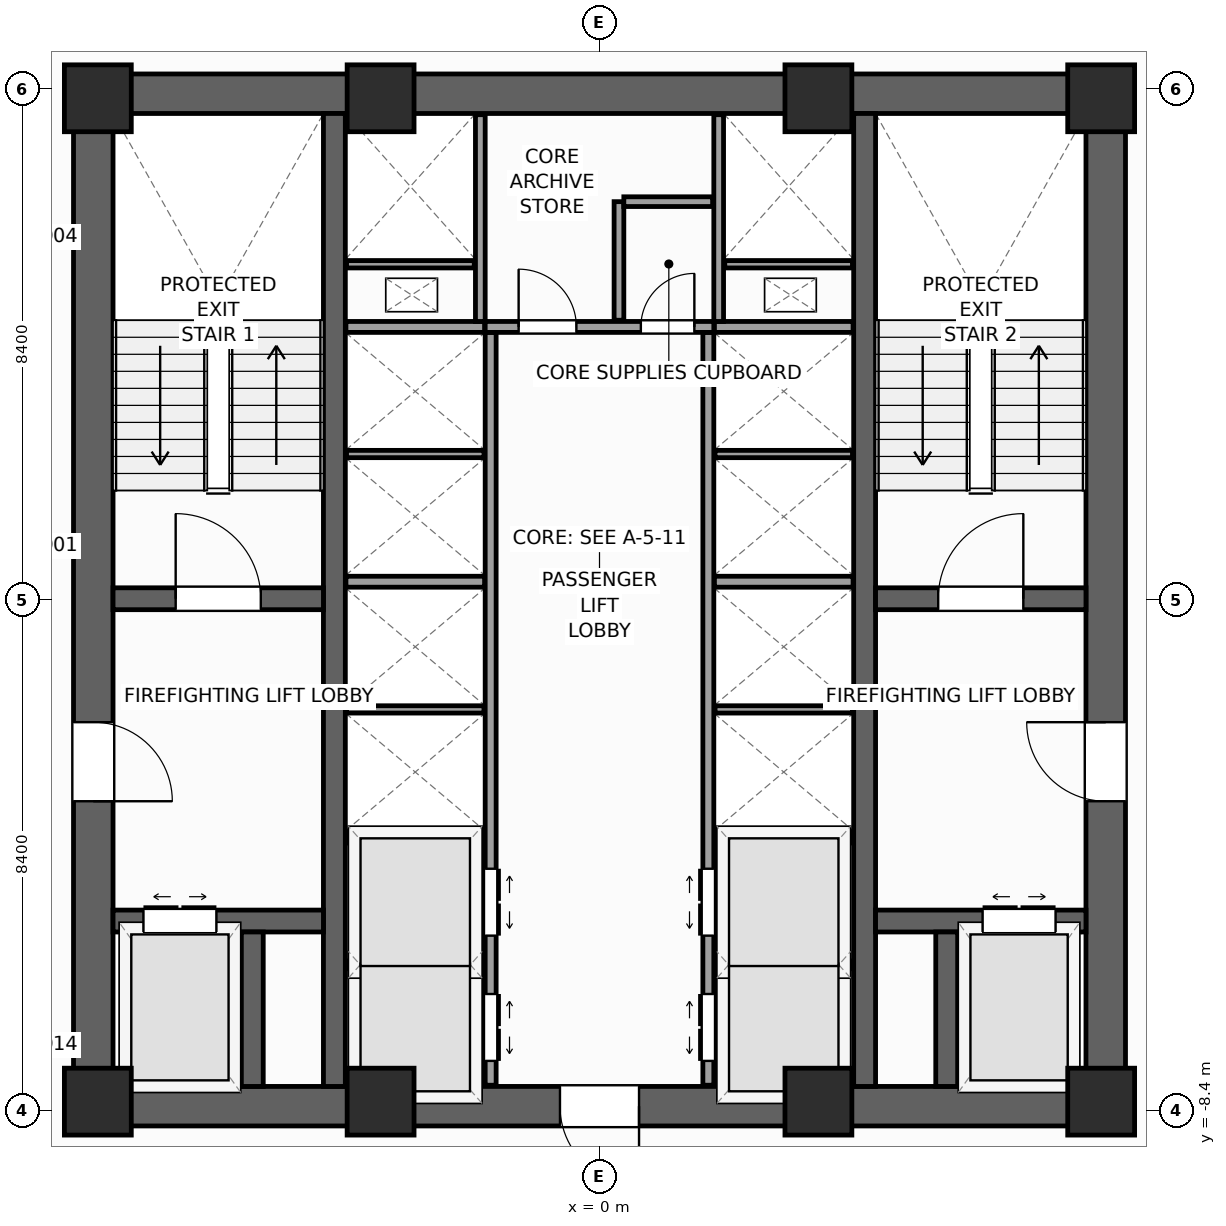
"""IFC4 building model, lengths in metres.
Left out: names, types, materials, properties, quantities, classifications, styles, units other than length and angle.
Written with IfcOpenShell. Run it as: python <this file> out.ifc"""

import sys

from ifc_helpers import new_model, si_unit, direction, frame, frame_2d, origin, origin_2d, place, context, subcontext, project, spatial, rectangle, extrude, source, transform, mapped, element, fill, save


model = new_model("IFC4")
c1 = context("Model", 3, precision=1e-05, world=origin(), true_north=direction((0.0, 1.0)))
c2 = subcontext(c1, "Body", "Model", "MODEL_VIEW")
j1 = project(units=[si_unit("LENGTHUNIT", "METRE"), si_unit("PLANEANGLEUNIT", "RADIAN")], contexts=[c1])
p1 = place(None, origin())
s1 = spatial("IfcSite", under=j1, at=p1, CompositionType="ELEMENT")
p2 = place(p1, origin())
s2 = spatial("IfcBuilding", under=s1, at=p2, CompositionType="ELEMENT")
p3 = place(p2, frame((0.0, 0.0, 119.2)))
s3 = spatial("IfcBuildingStorey", under=s2, at=p3, CompositionType="ELEMENT", Elevation=119.2)
p4 = place(p3, frame((-8.65, -8.325, 0.0), z_axis=(0.0, 0.0, 1.0), x_axis=(1.0, 0.0, 0.0)))
e1 = element("IfcWall", 1, at=p4, inside=s3, PredefinedType="SHEAR", context=c2, shape_type="SweptSolid", body=[
    extrude(rectangle(XDim=17.3, YDim=0.65, at=frame_2d((8.65, 0.0))), origin(), (0.0, 0.0, 1.0), 4.0),
])
p5 = place(p4, frame((8.0, 0.0, 0.0)))
e2 = element("IfcOpeningElement", 2, at=p5, cuts=e1, PredefinedType="OPENING", context=c2, shape_type="SweptSolid", body=[
    extrude(rectangle(XDim=1.3, YDim=2.2, at=frame_2d((0.65, 1.1))), frame((0.0, 0.335, 0.0), z_axis=(0.0, -1.0, 0.0), x_axis=(1.0, 0.0, 0.0)), (0.0, 0.0, 1.0), 0.67),
])
p6 = place(p3, frame((-8.65, 8.325, 0.0), z_axis=(0.0, 0.0, 1.0), x_axis=(1.0, 0.0, 0.0)))
e3 = element("IfcWall", 3, at=p6, inside=s3, PredefinedType="SHEAR", context=c2, shape_type="SweptSolid", body=[
    extrude(rectangle(XDim=17.3, YDim=0.65, at=frame_2d((8.65, 0.0))), origin(), (0.0, 0.0, 1.0), 4.0),
])
p7 = place(p3, frame((-8.325, -8.0, 0.0), z_axis=(0.0, 0.0, 1.0), x_axis=(0.0, 1.0, 0.0)))
e4 = element("IfcWall", 4, at=p7, inside=s3, PredefinedType="SHEAR", context=c2, shape_type="SweptSolid", body=[
    extrude(rectangle(XDim=16.0, YDim=0.65, at=frame_2d((8.0, 0.0))), origin(), (0.0, 0.0, 1.0), 4.0),
])
p8 = place(p7, frame((4.69, 0.0, 0.0)))
e5 = element("IfcOpeningElement", 5, at=p8, cuts=e4, PredefinedType="OPENING", context=c2, shape_type="SweptSolid", body=[
    extrude(rectangle(XDim=1.3, YDim=2.2, at=frame_2d((0.65, 1.1))), frame((0.0, 0.335, 0.0), z_axis=(0.0, -1.0, 0.0), x_axis=(1.0, 0.0, 0.0)), (0.0, 0.0, 1.0), 0.67),
])
p9 = place(p3, frame((8.325, -8.0, 0.0), z_axis=(0.0, 0.0, 1.0), x_axis=(0.0, 1.0, 0.0)))
e6 = element("IfcWall", 6, at=p9, inside=s3, PredefinedType="SHEAR", context=c2, shape_type="SweptSolid", body=[
    extrude(rectangle(XDim=16.0, YDim=0.65, at=frame_2d((8.0, 0.0))), origin(), (0.0, 0.0, 1.0), 4.0),
])
p10 = place(p9, frame((4.69, 0.0, 0.0)))
e7 = element("IfcOpeningElement", 7, at=p10, cuts=e6, PredefinedType="OPENING", context=c2, shape_type="SweptSolid", body=[
    extrude(rectangle(XDim=1.3, YDim=2.2, at=frame_2d((0.65, 1.1))), frame((0.0, 0.335, 0.0), z_axis=(0.0, -1.0, 0.0), x_axis=(1.0, 0.0, 0.0)), (0.0, 0.0, 1.0), 0.67),
])
for number, where, z_axis, x_axis in (
    (8, (-4.36, -8.0, 0.0), (0.0, 0.0, 1.0), (0.0, 1.0, 0.0)),
    (9, (4.36, -8.0, 0.0), (0.0, 0.0, 1.0), (0.0, 1.0, 0.0)),
):
    element("IfcWall", number, at=place(p3, frame(where, z_axis=z_axis, x_axis=x_axis)), inside=s3, PredefinedType="SHEAR", context=c2, shape_type="SweptSolid", body=[
        extrude(rectangle(XDim=16.0, YDim=0.36, at=frame_2d((8.0, 0.0))), origin(), (0.0, 0.0, 1.0), 4.0),
    ])
p11 = place(p3, frame((-8.0, 0.02, 0.0), z_axis=(0.0, 0.0, 1.0), x_axis=(1.0, 0.0, 0.0)))
e10 = element("IfcWall", 10, at=p11, inside=s3, PredefinedType="SHEAR", context=c2, shape_type="SweptSolid", body=[
    extrude(rectangle(XDim=3.46, YDim=0.36, at=frame_2d((1.73, 0.0))), origin(), (0.0, 0.0, 1.0), 4.0),
])
p12 = place(p11, frame((1.03, 0.0, 0.0)))
e11 = element("IfcOpeningElement", 11, at=p12, cuts=e10, PredefinedType="OPENING", context=c2, shape_type="SweptSolid", body=[
    extrude(rectangle(XDim=1.4, YDim=2.2, at=frame_2d((0.7, 1.1))), frame((0.0, 0.19, 0.0), z_axis=(0.0, -1.0, 0.0), x_axis=(1.0, 0.0, 0.0)), (0.0, 0.0, 1.0), 0.38),
])
p13 = place(p3, frame((4.54, 0.02, 0.0), z_axis=(0.0, 0.0, 1.0), x_axis=(1.0, 0.0, 0.0)))
e12 = element("IfcWall", 12, at=p13, inside=s3, PredefinedType="SHEAR", context=c2, shape_type="SweptSolid", body=[
    extrude(rectangle(XDim=3.46, YDim=0.36, at=frame_2d((1.73, 0.0))), origin(), (0.0, 0.0, 1.0), 4.0),
])
p14 = place(p13, frame((1.03, 0.0, 0.0)))
e13 = element("IfcOpeningElement", 13, at=p14, cuts=e12, PredefinedType="OPENING", context=c2, shape_type="SweptSolid", body=[
    extrude(rectangle(XDim=1.4, YDim=2.2, at=frame_2d((0.7, 1.1))), frame((0.0, 0.19, 0.0), z_axis=(0.0, -1.0, 0.0), x_axis=(1.0, 0.0, 0.0)), (0.0, 0.0, 1.0), 0.38),
])
p15 = place(p3, frame((-8.0, -5.28, 0.0), z_axis=(0.0, 0.0, 1.0), x_axis=(1.0, 0.0, 0.0)))
e14 = element("IfcWall", 14, at=p15, inside=s3, PredefinedType="SHEAR", context=c2, shape_type="SweptSolid", body=[
    extrude(rectangle(XDim=3.46, YDim=0.36, at=frame_2d((1.73, 0.0))), origin(), (0.0, 0.0, 1.0), 4.0),
])
p16 = place(p15, frame((0.5, 0.0, 0.0)))
e15 = element("IfcOpeningElement", 15, at=p16, cuts=e14, PredefinedType="OPENING", context=c2, shape_type="SweptSolid", body=[
    extrude(rectangle(XDim=1.2, YDim=2.25, at=frame_2d((0.6, 1.125))), frame((0.0, 0.19, 0.0), z_axis=(0.0, -1.0, 0.0), x_axis=(1.0, 0.0, 0.0)), (0.0, 0.0, 1.0), 0.38),
])
p17 = place(p3, frame((4.54, -5.28, 0.0), z_axis=(0.0, 0.0, 1.0), x_axis=(1.0, 0.0, 0.0)))
e16 = element("IfcWall", 16, at=p17, inside=s3, PredefinedType="SHEAR", context=c2, shape_type="SweptSolid", body=[
    extrude(rectangle(XDim=3.46, YDim=0.36, at=frame_2d((1.73, 0.0))), origin(), (0.0, 0.0, 1.0), 4.0),
])
p18 = place(p17, frame((1.76, 0.0, 0.0)))
e17 = element("IfcOpeningElement", 17, at=p18, cuts=e16, PredefinedType="OPENING", context=c2, shape_type="SweptSolid", body=[
    extrude(rectangle(XDim=1.2, YDim=2.25, at=frame_2d((0.6, 1.125))), frame((0.0, 0.19, 0.0), z_axis=(0.0, -1.0, 0.0), x_axis=(1.0, 0.0, 0.0)), (0.0, 0.0, 1.0), 0.38),
])
for number, where, z_axis, x_axis in (
    (18, (-5.71, -8.0, 0.0), (0.0, 0.0, 1.0), (0.0, 1.0, 0.0)),
    (19, (5.71, -8.0, 0.0), (0.0, 0.0, 1.0), (0.0, 1.0, 0.0)),
):
    element("IfcWall", number, at=place(p3, frame(where, z_axis=z_axis, x_axis=x_axis)), inside=s3, PredefinedType="SHEAR", context=c2, shape_type="SweptSolid", body=[
        extrude(rectangle(XDim=2.54, YDim=0.36, at=frame_2d((1.27, 0.0))), origin(), (0.0, 0.0, 1.0), 4.0),
    ])
m1 = source(origin(), c2, "Body", "SweptSolid", [
    extrude(rectangle(XDim=1.1, YDim=1.1, at=origin_2d()), origin(), (0.0, 0.0, 1.0), 4.0),
])
for number, where, z_axis, x_axis in (
    (20, (-8.25, -8.25, 0.0), (0.0, 0.0, 1.0), (1.0, 0.0, 0.0)),
    (21, (8.25, -8.25, 0.0), (0.0, 0.0, 1.0), (1.0, 0.0, 0.0)),
    (22, (8.25, 8.25, 0.0), (0.0, 0.0, 1.0), (1.0, 0.0, 0.0)),
    (23, (-8.25, 8.25, 0.0), (0.0, 0.0, 1.0), (1.0, 0.0, 0.0)),
    (24, (-3.6, -8.25, 0.0), (0.0, 0.0, 1.0), (1.0, 0.0, 0.0)),
    (25, (3.6, -8.25, 0.0), (0.0, 0.0, 1.0), (1.0, 0.0, 0.0)),
    (26, (-3.6, 8.25, 0.0), (0.0, 0.0, 1.0), (1.0, 0.0, 0.0)),
    (27, (3.6, 8.25, 0.0), (0.0, 0.0, 1.0), (1.0, 0.0, 0.0)),
):
    element("IfcColumn", number, at=place(p3, frame(where, z_axis=z_axis, x_axis=x_axis)), inside=s3, PredefinedType="PILASTER", context=c2, shape_type="MappedRepresentation", body=[
        mapped(m1, transform((0.0, 0.0, 0.0), scale=1.0)),
    ])
p19 = place(p3, frame((-1.79, -7.98, 0.0), z_axis=(0.0, 0.0, 1.0), x_axis=(0.0, 1.0, 0.0)))
e28 = element("IfcWall", 28, at=p19, inside=s3, PredefinedType="PARTITIONING", context=c2, shape_type="SweptSolid", body=[
    extrude(rectangle(XDim=12.38, YDim=0.18, at=frame_2d((6.19, 0.0))), origin(), (0.0, 0.0, 1.0), 3.74),
])
p20 = place(p19, frame((0.4, 0.0, 0.0)))
e29 = element("IfcOpeningElement", 29, at=p20, cuts=e28, PredefinedType="OPENING", context=c2, shape_type="SweptSolid", body=[
    extrude(rectangle(XDim=1.1, YDim=2.2, at=frame_2d((0.55, 1.1))), frame((0.0, 0.1, 0.0), z_axis=(0.0, -1.0, 0.0), x_axis=(1.0, 0.0, 0.0)), (0.0, 0.0, 1.0), 0.2),
])
p21 = place(p19, frame((2.46, 0.0, 0.0)))
e30 = element("IfcOpeningElement", 30, at=p21, cuts=e28, PredefinedType="OPENING", context=c2, shape_type="SweptSolid", body=[
    extrude(rectangle(XDim=1.1, YDim=2.2, at=frame_2d((0.55, 1.1))), frame((0.0, 0.1, 0.0), z_axis=(0.0, -1.0, 0.0), x_axis=(1.0, 0.0, 0.0)), (0.0, 0.0, 1.0), 0.2),
])
p22 = place(p3, frame((1.79, -7.98, 0.0), z_axis=(0.0, 0.0, 1.0), x_axis=(0.0, 1.0, 0.0)))
e31 = element("IfcWall", 31, at=p22, inside=s3, PredefinedType="PARTITIONING", context=c2, shape_type="SweptSolid", body=[
    extrude(rectangle(XDim=12.38, YDim=0.18, at=frame_2d((6.19, 0.0))), origin(), (0.0, 0.0, 1.0), 3.74),
])
p23 = place(p22, frame((0.4, 0.0, 0.0)))
e32 = element("IfcOpeningElement", 32, at=p23, cuts=e31, PredefinedType="OPENING", context=c2, shape_type="SweptSolid", body=[
    extrude(rectangle(XDim=1.1, YDim=2.2, at=frame_2d((0.55, 1.1))), frame((0.0, 0.1, 0.0), z_axis=(0.0, -1.0, 0.0), x_axis=(1.0, 0.0, 0.0)), (0.0, 0.0, 1.0), 0.2),
])
p24 = place(p22, frame((2.46, 0.0, 0.0)))
e33 = element("IfcOpeningElement", 33, at=p24, cuts=e31, PredefinedType="OPENING", context=c2, shape_type="SweptSolid", body=[
    extrude(rectangle(XDim=1.1, YDim=2.2, at=frame_2d((0.55, 1.1))), frame((0.0, 0.1, 0.0), z_axis=(0.0, -1.0, 0.0), x_axis=(1.0, 0.0, 0.0)), (0.0, 0.0, 1.0), 0.2),
])
p25 = place(p3, frame((-1.88, 4.49, 0.0), z_axis=(0.0, 0.0, 1.0), x_axis=(1.0, 0.0, 0.0)))
e34 = element("IfcWall", 34, at=p25, inside=s3, PredefinedType="PARTITIONING", context=c2, shape_type="SweptSolid", body=[
    extrude(rectangle(XDim=3.76, YDim=0.18, at=frame_2d((1.88, 0.0))), origin(), (0.0, 0.0, 1.0), 3.74),
])
p26 = place(p25, frame((0.55, 0.0, 0.0)))
e35 = element("IfcOpeningElement", 35, at=p26, cuts=e34, PredefinedType="OPENING", context=c2, shape_type="SweptSolid", body=[
    extrude(rectangle(XDim=0.95, YDim=2.1, at=frame_2d((0.475, 1.05))), frame((0.0, 0.1, 0.0), z_axis=(0.0, -1.0, 0.0), x_axis=(1.0, 0.0, 0.0)), (0.0, 0.0, 1.0), 0.2),
])
p27 = place(p25, frame((2.56, 0.0, 0.0)))
e36 = element("IfcOpeningElement", 36, at=p27, cuts=e34, PredefinedType="OPENING", context=c2, shape_type="SweptSolid", body=[
    extrude(rectangle(XDim=0.88, YDim=2.1, at=frame_2d((0.44, 1.05))), frame((0.0, 0.1, 0.0), z_axis=(0.0, -1.0, 0.0), x_axis=(1.0, 0.0, 0.0)), (0.0, 0.0, 1.0), 0.2),
])
for number, where, z_axis, x_axis in (
    (37, (-4.17, -3.9, 0.0), (0.0, 0.0, 1.0), (1.0, 0.0, 0.0)),
    (38, (1.89, -3.9, 0.0), (0.0, 0.0, 1.0), (1.0, 0.0, 0.0)),
    (39, (-4.17, 0.3, 0.0), (0.0, 0.0, 1.0), (1.0, 0.0, 0.0)),
    (40, (1.89, 0.3, 0.0), (0.0, 0.0, 1.0), (1.0, 0.0, 0.0)),
    (41, (-4.17, 4.49, 0.0), (0.0, 0.0, 1.0), (1.0, 0.0, 0.0)),
    (42, (1.89, 4.49, 0.0), (0.0, 0.0, 1.0), (1.0, 0.0, 0.0)),
):
    element("IfcWall", number, at=place(p3, frame(where, z_axis=z_axis, x_axis=x_axis)), inside=s3, PredefinedType="PARTITIONING", context=c2, shape_type="SweptSolid", body=[
        extrude(rectangle(XDim=2.28, YDim=0.18, at=frame_2d((1.14, 0.0))), origin(), (0.0, 0.0, 1.0), 3.74),
    ])
for number, where, z_axis, x_axis in (
    (43, (-4.16, -6.0, 0.0), (0.0, 0.0, 1.0), (1.0, 0.0, 0.0)),
    (44, (1.9, -6.0, 0.0), (0.0, 0.0, 1.0), (1.0, 0.0, 0.0)),
    (45, (-4.16, -1.8, 0.0), (0.0, 0.0, 1.0), (1.0, 0.0, 0.0)),
    (46, (1.9, -1.8, 0.0), (0.0, 0.0, 1.0), (1.0, 0.0, 0.0)),
    (47, (-4.16, 2.4, 0.0), (0.0, 0.0, 1.0), (1.0, 0.0, 0.0)),
    (48, (1.9, 2.4, 0.0), (0.0, 0.0, 1.0), (1.0, 0.0, 0.0)),
):
    element("IfcWall", number, at=place(p3, frame(where, z_axis=z_axis, x_axis=x_axis)), inside=s3, PredefinedType="PARTITIONING", context=c2, shape_type="SweptSolid", body=[
        extrude(rectangle(XDim=2.26, YDim=0.12, at=frame_2d((1.13, 0.0))), origin(), (0.0, 0.0, 1.0), 3.74),
    ])
for number, where, z_axis, x_axis in (
    (49, (-1.96, 4.58, 0.0), (0.0, 0.0, 1.0), (0.0, 1.0, 0.0)),
    (50, (1.96, 4.58, 0.0), (0.0, 0.0, 1.0), (0.0, 1.0, 0.0)),
):
    element("IfcWall", number, at=place(p3, frame(where, z_axis=z_axis, x_axis=x_axis)), inside=s3, PredefinedType="PARTITIONING", context=c2, shape_type="SweptSolid", body=[
        extrude(rectangle(XDim=3.4, YDim=0.16, at=frame_2d((1.7, 0.0))), origin(), (0.0, 0.0, 1.0), 3.74),
    ])
for number, where, z_axis, x_axis in (
    (51, (-4.16, 5.52, 0.0), (0.0, 0.0, 1.0), (1.0, 0.0, 0.0)),
    (52, (2.06, 5.52, 0.0), (0.0, 0.0, 1.0), (1.0, 0.0, 0.0)),
):
    element("IfcWall", number, at=place(p3, frame(where, z_axis=z_axis, x_axis=x_axis)), inside=s3, PredefinedType="PARTITIONING", context=c2, shape_type="SweptSolid", body=[
        extrude(rectangle(XDim=2.1, YDim=0.12, at=frame_2d((1.05, 0.0))), origin(), (0.0, 0.0, 1.0), 3.74),
    ])
p28 = place(p3, frame((0.32, 4.6, 0.0), z_axis=(0.0, 0.0, 1.0), x_axis=(0.0, 1.0, 0.0)))
e53 = element("IfcWall", 53, at=p28, inside=s3, PredefinedType="PARTITIONING", context=c2, shape_type="SweptSolid", body=[
    extrude(rectangle(XDim=1.95, YDim=0.16, at=frame_2d((0.975, 0.0))), origin(), (0.0, 0.0, 1.0), 3.74),
])
p29 = place(p3, frame((0.4, 6.55, 0.0), z_axis=(0.0, 0.0, 1.0), x_axis=(1.0, 0.0, 0.0)))
e54 = element("IfcWall", 54, at=p29, inside=s3, PredefinedType="PARTITIONING", context=c2, shape_type="SweptSolid", body=[
    extrude(rectangle(XDim=1.46, YDim=0.16, at=frame_2d((0.73, 0.0))), origin(), (0.0, 0.0, 1.0), 3.74),
])
m2 = source(origin(), c2, "Body", "SweptSolid", [
    extrude(rectangle(XDim=1.4, YDim=2.2, at=frame_2d((0.7, 1.1))), frame((0.0, 0.025, 0.0), z_axis=(0.0, -1.0, 0.0), x_axis=(1.0, 0.0, 0.0)), (0.0, 0.0, 1.0), 0.05),
])
p30 = place(p12, origin())
e55 = element("IfcDoor", 55, at=p30, inside=s3, OperationType="SINGLE_SWING_LEFT", PredefinedType="DOOR", context=c2, shape_type="MappedRepresentation", body=[
    mapped(m2, transform((0.0, 0.0, 0.0), scale=1.0)),
])
fill(e11, e55)
p31 = place(p14, origin())
e56 = element("IfcDoor", 56, at=p31, inside=s3, OperationType="SINGLE_SWING_RIGHT", PredefinedType="DOOR", context=c2, shape_type="MappedRepresentation", body=[
    mapped(m2, transform((0.0, 0.0, 0.0), scale=1.0)),
])
fill(e13, e56)
m3 = source(origin(), c2, "Body", "SweptSolid", [
    extrude(rectangle(XDim=1.3, YDim=2.2, at=frame_2d((0.65, 1.1))), frame((0.0, 0.025, 0.0), z_axis=(0.0, -1.0, 0.0), x_axis=(1.0, 0.0, 0.0)), (0.0, 0.0, 1.0), 0.05),
])
p32 = place(p8, frame((1.3, 0.0, 0.0), z_axis=(0.0, 0.0, 1.0), x_axis=(-1.0, 0.0, 0.0)))
e57 = element("IfcDoor", 57, at=p32, inside=s3, OperationType="SINGLE_SWING_LEFT", PredefinedType="DOOR", context=c2, shape_type="MappedRepresentation", body=[
    mapped(m3, transform((0.0, 0.0, 0.0), scale=1.0)),
])
fill(e5, e57)
p33 = place(p10, origin())
e58 = element("IfcDoor", 58, at=p33, inside=s3, OperationType="SINGLE_SWING_RIGHT", PredefinedType="DOOR", context=c2, shape_type="MappedRepresentation", body=[
    mapped(m3, transform((0.0, 0.0, 0.0), scale=1.0)),
])
fill(e7, e58)
p34 = place(p5, frame((1.3, 0.0, 0.0), z_axis=(0.0, 0.0, 1.0), x_axis=(-1.0, 0.0, 0.0)))
e59 = element("IfcDoor", 59, at=p34, inside=s3, OperationType="SINGLE_SWING_RIGHT", PredefinedType="DOOR", context=c2, shape_type="MappedRepresentation", body=[
    mapped(m3, transform((0.0, 0.0, 0.0), scale=1.0)),
])
fill(e2, e59)
m4 = source(origin(), c2, "Body", "SweptSolid", [
    extrude(rectangle(XDim=1.2, YDim=2.25, at=frame_2d((0.6, 1.125))), frame((0.0, 0.025, 0.0), z_axis=(0.0, -1.0, 0.0), x_axis=(1.0, 0.0, 0.0)), (0.0, 0.0, 1.0), 0.05),
])
p35 = place(p16, origin())
e60 = element("IfcDoor", 60, at=p35, inside=s3, OperationType="DOUBLE_DOOR_SLIDING", PredefinedType="DOOR", context=c2, shape_type="MappedRepresentation", body=[
    mapped(m4, transform((0.0, 0.0, 0.0), scale=1.0)),
])
fill(e15, e60)
p36 = place(p18, origin())
e61 = element("IfcDoor", 61, at=p36, inside=s3, OperationType="DOUBLE_DOOR_SLIDING", PredefinedType="DOOR", context=c2, shape_type="MappedRepresentation", body=[
    mapped(m4, transform((0.0, 0.0, 0.0), scale=1.0)),
])
fill(e17, e61)
m5 = source(origin(), c2, "Body", "SweptSolid", [
    extrude(rectangle(XDim=1.1, YDim=2.2, at=frame_2d((0.55, 1.1))), frame((0.0, 0.025, 0.0), z_axis=(0.0, -1.0, 0.0), x_axis=(1.0, 0.0, 0.0)), (0.0, 0.0, 1.0), 0.05),
])
p37 = place(p20, frame((1.1, 0.0, 0.0), z_axis=(0.0, 0.0, 1.0), x_axis=(-1.0, 0.0, 0.0)))
e62 = element("IfcDoor", 62, at=p37, inside=s3, OperationType="DOUBLE_DOOR_SLIDING", PredefinedType="DOOR", context=c2, shape_type="MappedRepresentation", body=[
    mapped(m5, transform((0.0, 0.0, 0.0), scale=1.0)),
])
fill(e29, e62)
p38 = place(p21, frame((1.1, 0.0, 0.0), z_axis=(0.0, 0.0, 1.0), x_axis=(-1.0, 0.0, 0.0)))
e63 = element("IfcDoor", 63, at=p38, inside=s3, OperationType="DOUBLE_DOOR_SLIDING", PredefinedType="DOOR", context=c2, shape_type="MappedRepresentation", body=[
    mapped(m5, transform((0.0, 0.0, 0.0), scale=1.0)),
])
fill(e30, e63)
p39 = place(p23, origin())
e64 = element("IfcDoor", 64, at=p39, inside=s3, OperationType="DOUBLE_DOOR_SLIDING", PredefinedType="DOOR", context=c2, shape_type="MappedRepresentation", body=[
    mapped(m5, transform((0.0, 0.0, 0.0), scale=1.0)),
])
fill(e32, e64)
p40 = place(p24, origin())
e65 = element("IfcDoor", 65, at=p40, inside=s3, OperationType="DOUBLE_DOOR_SLIDING", PredefinedType="DOOR", context=c2, shape_type="MappedRepresentation", body=[
    mapped(m5, transform((0.0, 0.0, 0.0), scale=1.0)),
])
fill(e33, e65)
m6 = source(origin(), c2, "Body", "SweptSolid", [
    extrude(rectangle(XDim=0.95, YDim=2.1, at=frame_2d((0.475, 1.05))), frame((0.0, 0.025, 0.0), z_axis=(0.0, -1.0, 0.0), x_axis=(1.0, 0.0, 0.0)), (0.0, 0.0, 1.0), 0.05),
])
p41 = place(p26, origin())
e66 = element("IfcDoor", 66, at=p41, inside=s3, OperationType="SINGLE_SWING_LEFT", PredefinedType="DOOR", context=c2, shape_type="MappedRepresentation", body=[
    mapped(m6, transform((0.0, 0.0, 0.0), scale=1.0)),
])
fill(e35, e66)
m7 = source(origin(), c2, "Body", "SweptSolid", [
    extrude(rectangle(XDim=0.88, YDim=2.1, at=frame_2d((0.44, 1.05))), frame((0.0, 0.025, 0.0), z_axis=(0.0, -1.0, 0.0), x_axis=(1.0, 0.0, 0.0)), (0.0, 0.0, 1.0), 0.05),
])
p42 = place(p27, origin())
e67 = element("IfcDoor", 67, at=p42, inside=s3, OperationType="SINGLE_SWING_RIGHT", PredefinedType="DOOR", context=c2, shape_type="MappedRepresentation", body=[
    mapped(m7, transform((0.0, 0.0, 0.0), scale=1.0)),
])
fill(e36, e67)
save(model, sys.argv[1])
